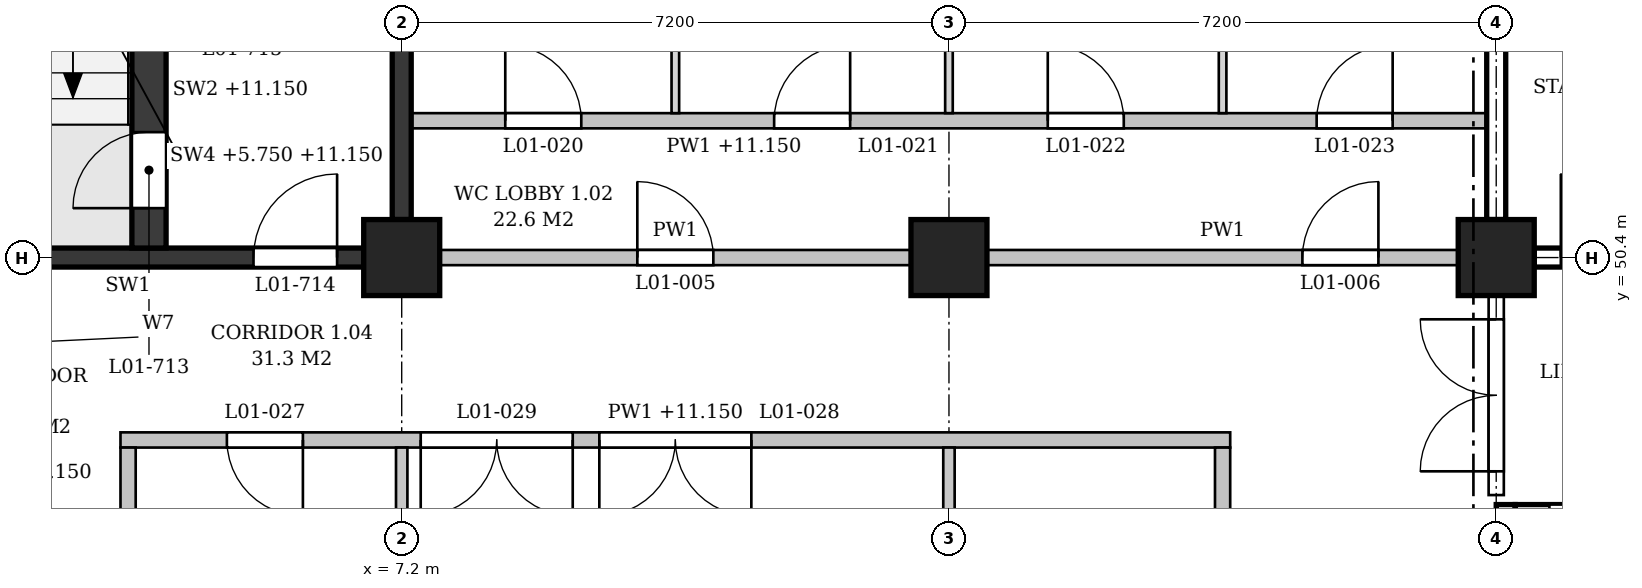
"""IFC4 building model, lengths in metres.
Left out: names, types, materials, properties, quantities, classifications, styles, units other than length and angle.
Written with IfcOpenShell. Run it as: python <this file> out.ifc"""

import sys

from ifc_helpers import new_model, si_unit, direction, frame, frame_2d, origin, origin_2d, place, context, subcontext, project, spatial, polyline, rectangle, outline, extrude, element, fill, save


model = new_model("IFC4")
c1 = context("Model", 3, precision=1e-05, world=origin(), true_north=direction((0.0, 1.0)))
c2 = subcontext(c1, "Body", "Model", "MODEL_VIEW")
j1 = project(units=[si_unit("LENGTHUNIT", "METRE"), si_unit("PLANEANGLEUNIT", "RADIAN")], contexts=[c1])
p1 = place(None, origin())
s1 = spatial("IfcSite", under=j1, at=p1, CompositionType="ELEMENT")
p2 = place(p1, origin())
s2 = spatial("IfcBuilding", under=s1, at=p2, CompositionType="ELEMENT")
p3 = place(p2, frame((0.0, 0.0, 6.0)))
s3 = spatial("IfcBuildingStorey", under=s2, at=p3, CompositionType="ELEMENT", Elevation=6.0)
for number, where, z_axis, x_axis in (
    (1, (7.2, 50.4, 0.0), (0.0, 0.0, 1.0), (1.0, 0.0, 0.0)),
    (2, (14.4, 50.4, 0.0), (0.0, 0.0, 1.0), (1.0, 0.0, 0.0)),
    (3, (21.6, 50.4, 0.0), (0.0, 0.0, 1.0), (1.0, 0.0, 0.0)),
):
    element("IfcColumn", number, at=place(p3, frame(where, z_axis=z_axis, x_axis=x_axis)), inside=s3, PredefinedType="COLUMN", context=c2, shape_type="SweptSolid", body=[
        extrude(rectangle(XDim=1.0, YDim=1.0, at=origin_2d()), origin(), (0.0, 0.0, 1.0), 5.4),
    ])
p4 = place(p3, frame((0.5, 50.4, 0.0), z_axis=(0.0, 0.0, 1.0), x_axis=(1.0, 0.0, 0.0)))
e4 = element("IfcWall", 4, at=p4, inside=s3, PredefinedType="SHEAR", context=c2, shape_type="SweptSolid", body=[
    extrude(rectangle(XDim=6.2, YDim=0.25, at=frame_2d((3.1, 0.0))), origin(), (0.0, 0.0, 1.0), 4.4),
])
p5 = place(p4, frame((4.75, 0.0, 0.0)))
e5 = element("IfcOpeningElement", 5, at=p5, cuts=e4, PredefinedType="OPENING", context=c2, shape_type="SweptSolid", body=[
    extrude(rectangle(XDim=1.1, YDim=2.1, at=frame_2d((0.55, 1.05))), frame((0.0, 0.135, 0.0), z_axis=(0.0, -1.0, 0.0), x_axis=(1.0, 0.0, 0.0)), (0.0, 0.0, 1.0), 0.27),
])
p6 = place(p3, frame((7.2, 50.9, 0.0), z_axis=(0.0, 0.0, 1.0), x_axis=(0.0, 1.0, 0.0)))
e6 = element("IfcWall", 6, at=p6, inside=s3, PredefinedType="SHEAR", context=c2, shape_type="SweptSolid", body=[
    extrude(rectangle(XDim=6.2, YDim=0.25, at=frame_2d((3.1, 0.0))), origin(), (0.0, 0.0, 1.0), 4.4),
])
p7 = place(p3, frame((3.875, 50.525, 0.0), z_axis=(0.0, 0.0, 1.0), x_axis=(0.0, 1.0, 0.0)))
e7 = element("IfcWall", 7, at=p7, inside=s3, PredefinedType="SHEAR", context=c2, shape_type="SweptSolid", body=[
    extrude(rectangle(XDim=6.925, YDim=0.45, at=frame_2d((3.462, 0.0))), origin(), (0.0, 0.0, 1.0), 5.15),
])
p8 = place(p7, frame((0.525, 0.0, 0.0)))
e8 = element("IfcOpeningElement", 8, at=p8, cuts=e7, PredefinedType="OPENING", context=c2, shape_type="SweptSolid", body=[
    extrude(rectangle(XDim=1.0, YDim=2.1, at=frame_2d((0.5, 1.05))), frame((0.0, 0.235, 0.0), z_axis=(0.0, -1.0, 0.0), x_axis=(1.0, 0.0, 0.0)), (0.0, 0.0, 1.0), 0.47),
])
p9 = place(p3, frame((22.1, 50.4, 0.0), z_axis=(0.0, 0.0, 1.0), x_axis=(1.0, 0.0, 0.0)))
e9 = element("IfcWall", 9, at=p9, inside=s3, PredefinedType="SHEAR", context=c2, shape_type="SweptSolid", body=[
    extrude(rectangle(XDim=6.2, YDim=0.25, at=frame_2d((3.1, 0.0))), origin(), (0.0, 0.0, 1.0), 4.4),
])
p10 = place(p9, frame((0.35, 0.0, 0.0)))
e10 = element("IfcOpeningElement", 10, at=p10, cuts=e9, PredefinedType="OPENING", context=c2, shape_type="SweptSolid", body=[
    extrude(rectangle(XDim=1.1, YDim=2.1, at=frame_2d((0.55, 1.05))), frame((0.0, 0.135, 0.0), z_axis=(0.0, -1.0, 0.0), x_axis=(1.0, 0.0, 0.0)), (0.0, 0.0, 1.0), 0.27),
])
p11 = place(p3, frame((21.6, 50.9, 0.0), z_axis=(0.0, 0.0, 1.0), x_axis=(0.0, 1.0, 0.0)))
e11 = element("IfcWall", 11, at=p11, inside=s3, PredefinedType="SHEAR", context=c2, shape_type="SweptSolid", body=[
    extrude(rectangle(XDim=6.2, YDim=0.25, at=frame_2d((3.1, 0.0))), origin(), (0.0, 0.0, 1.0), 4.4),
])
p12 = place(p3, frame((21.725, 43.7, -0.25), z_axis=(0.0, 0.0, 1.0), x_axis=(0.0, 1.0, 0.0)))
e12 = element("IfcWall", 12, at=p12, inside=s3, PredefinedType="SHEAR", context=c2, shape_type="SweptSolid", body=[
    extrude(rectangle(XDim=3.45, YDim=0.25, at=frame_2d((1.725, 0.0))), origin(), (0.0, 0.0, 1.0), 4.65),
])
p13 = place(p3, frame((21.85, 47.025, -0.25), z_axis=(0.0, 0.0, 1.0), x_axis=(1.0, 0.0, 0.0)))
e13 = element("IfcWall", 13, at=p13, inside=s3, PredefinedType="SHEAR", context=c2, shape_type="SweptSolid", body=[
    extrude(rectangle(XDim=2.0, YDim=0.25, at=frame_2d((1.0, 0.0))), origin(), (0.0, 0.0, 1.0), 5.4),
])
p14 = place(p13, frame((0.45, 0.0, 0.25)))
e14 = element("IfcOpeningElement", 14, at=p14, cuts=e13, PredefinedType="OPENING", context=c2, shape_type="SweptSolid", body=[
    extrude(rectangle(XDim=1.1, YDim=2.1, at=frame_2d((0.55, 1.05))), frame((0.0, 0.135, 0.0), z_axis=(0.0, -1.0, 0.0), x_axis=(1.0, 0.0, 0.0)), (0.0, 0.0, 1.0), 0.27),
])
p15 = place(p3, frame((3.5, 48.0, 0.0), z_axis=(0.0, 0.0, 1.0), x_axis=(1.0, 0.0, 0.0)))
e15 = element("IfcWall", 15, at=p15, inside=s3, PredefinedType="PARTITIONING", context=c2, shape_type="SweptSolid", body=[
    extrude(outline(polyline([(0.0, 0.0), (14.6, 0.0), (14.6, 5.15), (11.15, 5.15), (11.15, 4.4), (10.65, 4.4), (10.65, 5.15), (3.95, 5.15), (3.95, 4.4), (3.45, 4.4), (3.45, 5.15), (0.0, 5.15), (0.0, 0.0)])), frame((0.0, 0.1, 0.0), z_axis=(0.0, -1.0, 0.0), x_axis=(1.0, 0.0, 0.0)), (0.0, 0.0, 1.0), 0.2),
])
p16 = place(p15, frame((1.4, 0.0, 0.0)))
e16 = element("IfcOpeningElement", 16, at=p16, cuts=e15, PredefinedType="OPENING", context=c2, shape_type="SweptSolid", body=[
    extrude(rectangle(XDim=1.0, YDim=2.1, at=frame_2d((0.5, 1.05))), frame((0.0, 0.11, 0.0), z_axis=(0.0, -1.0, 0.0), x_axis=(1.0, 0.0, 0.0)), (0.0, 0.0, 1.0), 0.22),
])
p17 = place(p15, frame((6.3, 0.0, 0.0)))
e17 = element("IfcOpeningElement", 17, at=p17, cuts=e15, PredefinedType="OPENING", context=c2, shape_type="SweptSolid", body=[
    extrude(rectangle(XDim=2.0, YDim=2.1, at=frame_2d((1.0, 1.05))), frame((0.0, 0.11, 0.0), z_axis=(0.0, -1.0, 0.0), x_axis=(1.0, 0.0, 0.0)), (0.0, 0.0, 1.0), 0.22),
])
p18 = place(p15, frame((3.95, 0.0, 0.0)))
e18 = element("IfcOpeningElement", 18, at=p18, cuts=e15, PredefinedType="OPENING", context=c2, shape_type="SweptSolid", body=[
    extrude(rectangle(XDim=2.0, YDim=2.1, at=frame_2d((1.0, 1.05))), frame((0.0, 0.11, 0.0), z_axis=(0.0, -1.0, 0.0), x_axis=(1.0, 0.0, 0.0)), (0.0, 0.0, 1.0), 0.22),
])
p19 = place(p3, frame((7.7, 50.4, 0.0), z_axis=(0.0, 0.0, 1.0), x_axis=(1.0, 0.0, 0.0)))
e19 = element("IfcWall", 19, at=p19, inside=s3, PredefinedType="PARTITIONING", context=c2, shape_type="SweptSolid", body=[
    extrude(rectangle(XDim=6.2, YDim=0.2, at=frame_2d((3.1, 0.0))), origin(), (0.0, 0.0, 1.0), 4.4),
])
p20 = place(p19, frame((2.6, 0.0, 0.0)))
e20 = element("IfcOpeningElement", 20, at=p20, cuts=e19, PredefinedType="OPENING", context=c2, shape_type="SweptSolid", body=[
    extrude(rectangle(XDim=1.0, YDim=2.1, at=frame_2d((0.5, 1.05))), frame((0.0, 0.11, 0.0), z_axis=(0.0, -1.0, 0.0), x_axis=(1.0, 0.0, 0.0)), (0.0, 0.0, 1.0), 0.22),
])
p21 = place(p3, frame((14.9, 50.4, 0.0), z_axis=(0.0, 0.0, 1.0), x_axis=(1.0, 0.0, 0.0)))
e21 = element("IfcWall", 21, at=p21, inside=s3, PredefinedType="PARTITIONING", context=c2, shape_type="SweptSolid", body=[
    extrude(rectangle(XDim=6.2, YDim=0.2, at=frame_2d((3.1, 0.0))), origin(), (0.0, 0.0, 1.0), 4.4),
])
p22 = place(p21, frame((4.15, 0.0, 0.0)))
e22 = element("IfcOpeningElement", 22, at=p22, cuts=e21, PredefinedType="OPENING", context=c2, shape_type="SweptSolid", body=[
    extrude(rectangle(XDim=1.0, YDim=2.1, at=frame_2d((0.5, 1.05))), frame((0.0, 0.11, 0.0), z_axis=(0.0, -1.0, 0.0), x_axis=(1.0, 0.0, 0.0)), (0.0, 0.0, 1.0), 0.22),
])
p23 = place(p3, frame((7.325, 52.2, 0.0), z_axis=(0.0, 0.0, 1.0), x_axis=(1.0, 0.0, 0.0)))
e23 = element("IfcWall", 23, at=p23, inside=s3, PredefinedType="PARTITIONING", context=c2, shape_type="SweptSolid", body=[
    extrude(outline(polyline([(0.0, 0.0), (14.15, 0.0), (14.15, 4.4), (14.025, 4.4), (14.025, 5.15), (7.325, 5.15), (7.325, 4.4), (6.825, 4.4), (6.825, 5.15), (0.125, 5.15), (0.125, 4.4), (0.0, 4.4), (0.0, 0.0)])), frame((0.0, 0.1, 0.0), z_axis=(0.0, -1.0, 0.0), x_axis=(1.0, 0.0, 0.0)), (0.0, 0.0, 1.0), 0.2),
])
p24 = place(p23, frame((1.238, 0.0, 0.0)))
e24 = element("IfcOpeningElement", 24, at=p24, cuts=e23, PredefinedType="OPENING", context=c2, shape_type="SweptSolid", body=[
    extrude(rectangle(XDim=1.0, YDim=2.1, at=frame_2d((0.5, 1.05))), frame((0.0, 0.11, 0.0), z_axis=(0.0, -1.0, 0.0), x_axis=(1.0, 0.0, 0.0)), (0.0, 0.0, 1.0), 0.22),
])
p25 = place(p23, frame((4.775, 0.0, 0.0)))
e25 = element("IfcOpeningElement", 25, at=p25, cuts=e23, PredefinedType="OPENING", context=c2, shape_type="SweptSolid", body=[
    extrude(rectangle(XDim=1.0, YDim=2.1, at=frame_2d((0.5, 1.05))), frame((0.0, 0.11, 0.0), z_axis=(0.0, -1.0, 0.0), x_axis=(1.0, 0.0, 0.0)), (0.0, 0.0, 1.0), 0.22),
])
p26 = place(p23, frame((8.375, 0.0, 0.0)))
e26 = element("IfcOpeningElement", 26, at=p26, cuts=e23, PredefinedType="OPENING", context=c2, shape_type="SweptSolid", body=[
    extrude(rectangle(XDim=1.0, YDim=2.1, at=frame_2d((0.5, 1.05))), frame((0.0, 0.11, 0.0), z_axis=(0.0, -1.0, 0.0), x_axis=(1.0, 0.0, 0.0)), (0.0, 0.0, 1.0), 0.22),
])
p27 = place(p23, frame((11.913, 0.0, 0.0)))
e27 = element("IfcOpeningElement", 27, at=p27, cuts=e23, PredefinedType="OPENING", context=c2, shape_type="SweptSolid", body=[
    extrude(rectangle(XDim=1.0, YDim=2.1, at=frame_2d((0.5, 1.05))), frame((0.0, 0.11, 0.0), z_axis=(0.0, -1.0, 0.0), x_axis=(1.0, 0.0, 0.0)), (0.0, 0.0, 1.0), 0.22),
])
p28 = place(p3, frame((3.6, 46.8, 0.0), z_axis=(0.0, 0.0, 1.0), x_axis=(0.0, 1.0, 0.0)))
e28 = element("IfcWall", 28, at=p28, inside=s3, PredefinedType="PARTITIONING", context=c2, shape_type="SweptSolid", body=[
    extrude(rectangle(XDim=1.1, YDim=0.2, at=frame_2d((0.55, 0.0))), origin(), (0.0, 0.0, 1.0), 5.15),
])
p29 = place(p3, frame((7.2, 43.7, 0.0), z_axis=(0.0, 0.0, 1.0), x_axis=(0.0, 1.0, 0.0)))
e29 = element("IfcWall", 29, at=p29, inside=s3, PredefinedType="PARTITIONING", context=c2, shape_type="SweptSolid", body=[
    extrude(rectangle(XDim=4.2, YDim=0.15, at=frame_2d((2.1, 0.0))), origin(), (0.0, 0.0, 1.0), 4.4),
])
p30 = place(p3, frame((10.8, 52.3, 0.0), z_axis=(0.0, 0.0, 1.0), x_axis=(0.0, 1.0, 0.0)))
e30 = element("IfcWall", 30, at=p30, inside=s3, PredefinedType="PARTITIONING", context=c2, shape_type="SweptSolid", body=[
    extrude(rectangle(XDim=5.15, YDim=0.1, at=frame_2d((2.575, 0.0))), origin(), (0.0, 0.0, 1.0), 4.4),
])
p31 = place(p3, frame((14.4, 43.7, 0.0), z_axis=(0.0, 0.0, 1.0), x_axis=(0.0, 1.0, 0.0)))
e31 = element("IfcWall", 31, at=p31, inside=s3, PredefinedType="PARTITIONING", context=c2, shape_type="SweptSolid", body=[
    extrude(rectangle(XDim=4.2, YDim=0.15, at=frame_2d((2.1, 0.0))), origin(), (0.0, 0.0, 1.0), 4.4),
])
p32 = place(p3, frame((14.4, 52.3, 0.0), z_axis=(0.0, 0.0, 1.0), x_axis=(0.0, 1.0, 0.0)))
e32 = element("IfcWall", 32, at=p32, inside=s3, PredefinedType="PARTITIONING", context=c2, shape_type="SweptSolid", body=[
    extrude(rectangle(XDim=4.8, YDim=0.1, at=frame_2d((2.4, 0.0))), origin(), (0.0, 0.0, 1.0), 4.4),
])
p33 = place(p3, frame((18.0, 40.8, 0.0), z_axis=(0.0, 0.0, 1.0), x_axis=(0.0, 1.0, 0.0)))
e33 = element("IfcWall", 33, at=p33, inside=s3, PredefinedType="PARTITIONING", context=c2, shape_type="SweptSolid", body=[
    extrude(outline(polyline([(0.0, 0.0), (7.1, 0.0), (7.1, 5.15), (2.65, 5.15), (2.65, 4.4), (2.15, 4.4), (2.15, 5.15), (0.0, 5.15), (0.0, 0.0)])), frame((0.0, 0.1, 0.0), z_axis=(0.0, -1.0, 0.0), x_axis=(1.0, 0.0, 0.0)), (0.0, 0.0, 1.0), 0.2),
])
p34 = place(p33, frame((3.05, 0.0, 0.0)))
e34 = element("IfcOpeningElement", 34, at=p34, cuts=e33, PredefinedType="OPENING", context=c2, shape_type="SweptSolid", body=[
    extrude(rectangle(XDim=1.0, YDim=2.1, at=frame_2d((0.5, 1.05))), frame((0.0, 0.11, 0.0), z_axis=(0.0, -1.0, 0.0), x_axis=(1.0, 0.0, 0.0)), (0.0, 0.0, 1.0), 0.22),
])
p35 = place(p3, frame((18.0, 52.3, 0.0), z_axis=(0.0, 0.0, 1.0), x_axis=(0.0, 1.0, 0.0)))
e35 = element("IfcWall", 35, at=p35, inside=s3, PredefinedType="PARTITIONING", context=c2, shape_type="SweptSolid", body=[
    extrude(rectangle(XDim=5.15, YDim=0.1, at=frame_2d((2.575, 0.0))), origin(), (0.0, 0.0, 1.0), 4.4),
])
p36 = place(p3, frame((21.6, 47.275, 0.0), z_axis=(0.0, 0.0, 1.0), x_axis=(0.0, 1.0, 0.0)))
e36 = element("IfcWall", 36, at=p36, inside=s3, PredefinedType="PARTITIONING", context=c2, shape_type="SweptSolid", body=[
    extrude(rectangle(XDim=2.625, YDim=0.2, at=frame_2d((1.312, 0.0))), origin(), (0.0, 0.0, 1.0), 4.4),
])
p37 = place(p36, frame((0.312, 0.0, 0.0)))
e37 = element("IfcOpeningElement", 37, at=p37, cuts=e36, PredefinedType="OPENING", context=c2, shape_type="SweptSolid", body=[
    extrude(rectangle(XDim=2.0, YDim=2.4, at=frame_2d((1.0, 1.2))), frame((0.0, 0.11, 0.0), z_axis=(0.0, -1.0, 0.0), x_axis=(1.0, 0.0, 0.0)), (0.0, 0.0, 1.0), 0.22),
])
p38 = place(p8, origin())
e38 = element("IfcDoor", 38, at=p38, inside=s3, OperationType="SINGLE_SWING_LEFT", PredefinedType="DOOR", context=c2, shape_type="SweptSolid", body=[
    extrude(rectangle(XDim=1.0, YDim=2.1, at=frame_2d((0.5, 1.05))), frame((0.0, 0.025, 0.0), z_axis=(0.0, -1.0, 0.0), x_axis=(1.0, 0.0, 0.0)), (0.0, 0.0, 1.0), 0.05),
])
fill(e8, e38)
p39 = place(p5, origin())
e39 = element("IfcDoor", 39, at=p39, inside=s3, OperationType="SINGLE_SWING_RIGHT", PredefinedType="DOOR", context=c2, shape_type="SweptSolid", body=[
    extrude(rectangle(XDim=1.1, YDim=2.1, at=frame_2d((0.55, 1.05))), frame((0.0, 0.025, 0.0), z_axis=(0.0, -1.0, 0.0), x_axis=(1.0, 0.0, 0.0)), (0.0, 0.0, 1.0), 0.05),
])
fill(e5, e39)
p40 = place(p10, origin())
e40 = element("IfcDoor", 40, at=p40, inside=s3, OperationType="SINGLE_SWING_LEFT", PredefinedType="DOOR", context=c2, shape_type="SweptSolid", body=[
    extrude(rectangle(XDim=1.1, YDim=2.1, at=frame_2d((0.55, 1.05))), frame((0.0, 0.025, 0.0), z_axis=(0.0, -1.0, 0.0), x_axis=(1.0, 0.0, 0.0)), (0.0, 0.0, 1.0), 0.05),
])
fill(e10, e40)
p41 = place(p37, origin())
e41 = element("IfcDoor", 41, at=p41, inside=s3, OperationType="DOUBLE_DOOR_SINGLE_SWING", PredefinedType="DOOR", context=c2, shape_type="SweptSolid", body=[
    extrude(rectangle(XDim=2.0, YDim=2.4, at=frame_2d((1.0, 1.2))), frame((0.0, 0.025, 0.0), z_axis=(0.0, -1.0, 0.0), x_axis=(1.0, 0.0, 0.0)), (0.0, 0.0, 1.0), 0.05),
])
fill(e37, e41)
p42 = place(p20, origin())
e42 = element("IfcDoor", 42, at=p42, inside=s3, OperationType="SINGLE_SWING_LEFT", PredefinedType="DOOR", context=c2, shape_type="SweptSolid", body=[
    extrude(rectangle(XDim=1.0, YDim=2.1, at=frame_2d((0.5, 1.05))), frame((0.0, 0.025, 0.0), z_axis=(0.0, -1.0, 0.0), x_axis=(1.0, 0.0, 0.0)), (0.0, 0.0, 1.0), 0.05),
])
fill(e20, e42)
p43 = place(p22, origin())
e43 = element("IfcDoor", 43, at=p43, inside=s3, OperationType="SINGLE_SWING_RIGHT", PredefinedType="DOOR", context=c2, shape_type="SweptSolid", body=[
    extrude(rectangle(XDim=1.0, YDim=2.1, at=frame_2d((0.5, 1.05))), frame((0.0, 0.025, 0.0), z_axis=(0.0, -1.0, 0.0), x_axis=(1.0, 0.0, 0.0)), (0.0, 0.0, 1.0), 0.05),
])
fill(e22, e43)
p44 = place(p24, origin())
e44 = element("IfcDoor", 44, at=p44, inside=s3, OperationType="SINGLE_SWING_LEFT", PredefinedType="DOOR", context=c2, shape_type="SweptSolid", body=[
    extrude(rectangle(XDim=1.0, YDim=2.1, at=frame_2d((0.5, 1.05))), frame((0.0, 0.025, 0.0), z_axis=(0.0, -1.0, 0.0), x_axis=(1.0, 0.0, 0.0)), (0.0, 0.0, 1.0), 0.05),
])
fill(e24, e44)
p45 = place(p25, origin())
e45 = element("IfcDoor", 45, at=p45, inside=s3, OperationType="SINGLE_SWING_RIGHT", PredefinedType="DOOR", context=c2, shape_type="SweptSolid", body=[
    extrude(rectangle(XDim=1.0, YDim=2.1, at=frame_2d((0.5, 1.05))), frame((0.0, 0.025, 0.0), z_axis=(0.0, -1.0, 0.0), x_axis=(1.0, 0.0, 0.0)), (0.0, 0.0, 1.0), 0.05),
])
fill(e25, e45)
p46 = place(p26, origin())
e46 = element("IfcDoor", 46, at=p46, inside=s3, OperationType="SINGLE_SWING_LEFT", PredefinedType="DOOR", context=c2, shape_type="SweptSolid", body=[
    extrude(rectangle(XDim=1.0, YDim=2.1, at=frame_2d((0.5, 1.05))), frame((0.0, 0.025, 0.0), z_axis=(0.0, -1.0, 0.0), x_axis=(1.0, 0.0, 0.0)), (0.0, 0.0, 1.0), 0.05),
])
fill(e26, e46)
p47 = place(p27, origin())
e47 = element("IfcDoor", 47, at=p47, inside=s3, OperationType="SINGLE_SWING_RIGHT", PredefinedType="DOOR", context=c2, shape_type="SweptSolid", body=[
    extrude(rectangle(XDim=1.0, YDim=2.1, at=frame_2d((0.5, 1.05))), frame((0.0, 0.025, 0.0), z_axis=(0.0, -1.0, 0.0), x_axis=(1.0, 0.0, 0.0)), (0.0, 0.0, 1.0), 0.05),
])
fill(e27, e47)
p48 = place(p16, frame((1.0, 0.0, 0.0), z_axis=(0.0, 0.0, 1.0), x_axis=(-1.0, 0.0, 0.0)))
e48 = element("IfcDoor", 48, at=p48, inside=s3, OperationType="SINGLE_SWING_LEFT", PredefinedType="DOOR", context=c2, shape_type="SweptSolid", body=[
    extrude(rectangle(XDim=1.0, YDim=2.1, at=frame_2d((0.5, 1.05))), frame((0.0, 0.025, 0.0), z_axis=(0.0, -1.0, 0.0), x_axis=(1.0, 0.0, 0.0)), (0.0, 0.0, 1.0), 0.05),
])
fill(e16, e48)
p49 = place(p17, origin())
e49 = element("IfcDoor", 49, at=p49, inside=s3, OperationType="DOUBLE_DOOR_SINGLE_SWING", PredefinedType="DOOR", context=c2, shape_type="SweptSolid", body=[
    extrude(rectangle(XDim=2.0, YDim=2.1, at=frame_2d((1.0, 1.05))), frame((0.0, 0.025, 0.0), z_axis=(0.0, -1.0, 0.0), x_axis=(1.0, 0.0, 0.0)), (0.0, 0.0, 1.0), 0.05),
])
fill(e17, e49)
p50 = place(p18, origin())
e50 = element("IfcDoor", 50, at=p50, inside=s3, OperationType="DOUBLE_DOOR_SINGLE_SWING", PredefinedType="DOOR", context=c2, shape_type="SweptSolid", body=[
    extrude(rectangle(XDim=2.0, YDim=2.1, at=frame_2d((1.0, 1.05))), frame((0.0, 0.025, 0.0), z_axis=(0.0, -1.0, 0.0), x_axis=(1.0, 0.0, 0.0)), (0.0, 0.0, 1.0), 0.05),
])
fill(e18, e50)
save(model, sys.argv[1])
